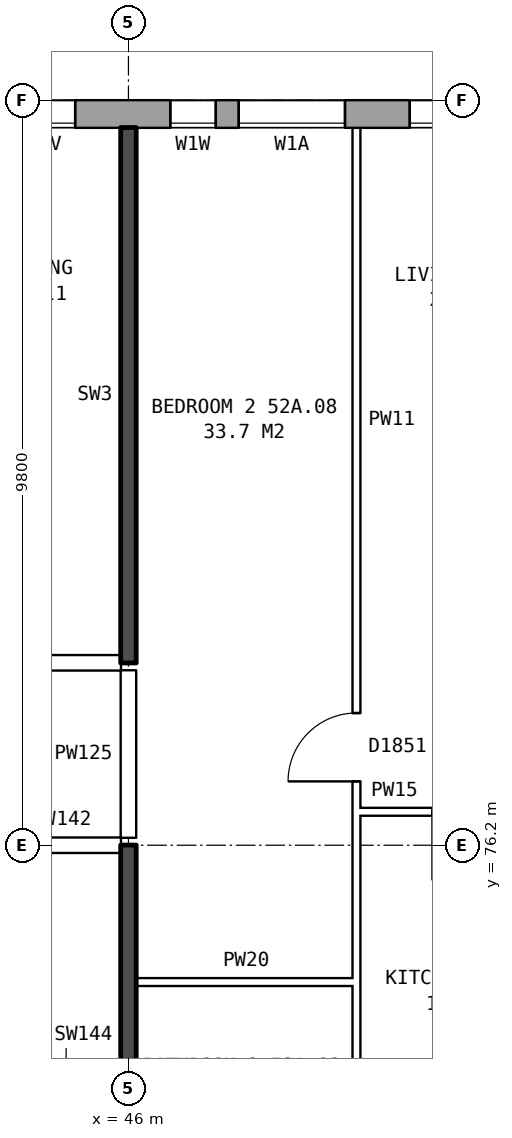
"""IFC4 building model, lengths in metres.
Left out: names, types, materials, properties, quantities, classifications, styles, units other than length and angle.
Written with IfcOpenShell. Run it as: python <this file> out.ifc"""

import sys

from ifc_helpers import new_model, si_unit, direction, frame, frame_2d, origin, place, context, subcontext, project, spatial, rectangle, extrude, element, fill, save


model = new_model("IFC4")
c1 = context("Model", 3, precision=1e-05, world=origin(), true_north=direction((0.0, 1.0)))
c2 = subcontext(c1, "Body", "Model", "MODEL_VIEW")
j1 = project(units=[si_unit("LENGTHUNIT", "METRE"), si_unit("PLANEANGLEUNIT", "RADIAN")], contexts=[c1])
p1 = place(None, origin())
s1 = spatial("IfcSite", under=j1, at=p1, CompositionType="ELEMENT")
p2 = place(p1, origin())
s2 = spatial("IfcBuilding", under=s1, at=p2, CompositionType="ELEMENT")
p3 = place(p2, frame((0.0, 0.0, 185.1)))
s3 = spatial("IfcBuildingStorey", under=s2, at=p3, CompositionType="ELEMENT", Elevation=185.1)
p4 = place(p3, frame((72.925, 85.82, 0.0), z_axis=(0.0, 0.0, 1.0), x_axis=(-1.0, 0.0, 0.0)))
e1 = element("IfcWall", 1, at=p4, inside=s3, PredefinedType="STANDARD", context=c2, shape_type="SweptSolid", body=[
    extrude(rectangle(XDim=39.601, YDim=0.36, at=frame_2d((19.8, 0.0))), origin(), (0.0, 0.0, 1.0), 2.85),
])
p5 = place(p4, frame((0.625, 0.0, 0.8)))
e2 = element("IfcOpeningElement", 2, at=p5, cuts=e1, PredefinedType="OPENING", context=c2, shape_type="SweptSolid", body=[
    extrude(rectangle(XDim=1.6, YDim=1.8, at=frame_2d((0.8, 0.9))), frame((0.0, 0.19, 0.0), z_axis=(0.0, -1.0, 0.0), x_axis=(1.0, 0.0, 0.0)), (0.0, 0.0, 1.0), 0.38),
])
p6 = place(p4, frame((3.625, 0.0, 0.8)))
e3 = element("IfcOpeningElement", 3, at=p6, cuts=e1, PredefinedType="OPENING", context=c2, shape_type="SweptSolid", body=[
    extrude(rectangle(XDim=1.6, YDim=1.8, at=frame_2d((0.8, 0.9))), frame((0.0, 0.19, 0.0), z_axis=(0.0, -1.0, 0.0), x_axis=(1.0, 0.0, 0.0)), (0.0, 0.0, 1.0), 0.38),
])
p7 = place(p4, frame((6.625, 0.0, 0.8)))
e4 = element("IfcOpeningElement", 4, at=p7, cuts=e1, PredefinedType="OPENING", context=c2, shape_type="SweptSolid", body=[
    extrude(rectangle(XDim=1.6, YDim=1.8, at=frame_2d((0.8, 0.9))), frame((0.0, 0.19, 0.0), z_axis=(0.0, -1.0, 0.0), x_axis=(1.0, 0.0, 0.0)), (0.0, 0.0, 1.0), 0.38),
])
p8 = place(p4, frame((9.625, 0.0, 0.8)))
e5 = element("IfcOpeningElement", 5, at=p8, cuts=e1, PredefinedType="OPENING", context=c2, shape_type="SweptSolid", body=[
    extrude(rectangle(XDim=1.6, YDim=1.8, at=frame_2d((0.8, 0.9))), frame((0.0, 0.19, 0.0), z_axis=(0.0, -1.0, 0.0), x_axis=(1.0, 0.0, 0.0)), (0.0, 0.0, 1.0), 0.38),
])
p9 = place(p4, frame((13.525, 0.0, 0.65)))
e6 = element("IfcOpeningElement", 6, at=p9, cuts=e1, PredefinedType="OPENING", context=c2, shape_type="SweptSolid", body=[
    extrude(rectangle(XDim=1.2, YDim=1.5, at=frame_2d((0.6, 0.75))), frame((0.0, 0.19, 0.0), z_axis=(0.0, -1.0, 0.0), x_axis=(1.0, 0.0, 0.0)), (0.0, 0.0, 1.0), 0.38),
])
p10 = place(p4, frame((15.625, 0.0, 0.8)))
e7 = element("IfcOpeningElement", 7, at=p10, cuts=e1, PredefinedType="OPENING", context=c2, shape_type="SweptSolid", body=[
    extrude(rectangle(XDim=1.6, YDim=1.8, at=frame_2d((0.8, 0.9))), frame((0.0, 0.19, 0.0), z_axis=(0.0, -1.0, 0.0), x_axis=(1.0, 0.0, 0.0)), (0.0, 0.0, 1.0), 0.38),
])
p11 = place(p4, frame((18.625, 0.0, 0.8)))
e8 = element("IfcOpeningElement", 8, at=p11, cuts=e1, PredefinedType="OPENING", context=c2, shape_type="SweptSolid", body=[
    extrude(rectangle(XDim=1.6, YDim=1.8, at=frame_2d((0.8, 0.9))), frame((0.0, 0.19, 0.0), z_axis=(0.0, -1.0, 0.0), x_axis=(1.0, 0.0, 0.0)), (0.0, 0.0, 1.0), 0.38),
])
p12 = place(p4, frame((21.625, 0.0, 0.8)))
e9 = element("IfcOpeningElement", 9, at=p12, cuts=e1, PredefinedType="OPENING", context=c2, shape_type="SweptSolid", body=[
    extrude(rectangle(XDim=1.6, YDim=1.8, at=frame_2d((0.8, 0.9))), frame((0.0, 0.19, 0.0), z_axis=(0.0, -1.0, 0.0), x_axis=(1.0, 0.0, 0.0)), (0.0, 0.0, 1.0), 0.38),
])
p13 = place(p4, frame((24.075, 0.0, 0.8)))
e10 = element("IfcOpeningElement", 10, at=p13, cuts=e1, PredefinedType="OPENING", context=c2, shape_type="SweptSolid", body=[
    extrude(rectangle(XDim=1.4, YDim=1.8, at=frame_2d((0.7, 0.9))), frame((0.0, 0.19, 0.0), z_axis=(0.0, -1.0, 0.0), x_axis=(1.0, 0.0, 0.0)), (0.0, 0.0, 1.0), 0.38),
])
p14 = place(p4, frame((27.625, 0.0, 1.7)))
e11 = element("IfcOpeningElement", 11, at=p14, cuts=e1, PredefinedType="OPENING", context=c2, shape_type="SweptSolid", body=[
    extrude(rectangle(XDim=0.8, YDim=0.9, at=frame_2d((0.4, 0.45))), frame((0.0, 0.19, 0.0), z_axis=(0.0, -1.0, 0.0), x_axis=(1.0, 0.0, 0.0)), (0.0, 0.0, 1.0), 0.38),
])
p15 = place(p4, frame((30.625, 0.0, 0.8)))
e12 = element("IfcOpeningElement", 12, at=p15, cuts=e1, PredefinedType="OPENING", context=c2, shape_type="SweptSolid", body=[
    extrude(rectangle(XDim=1.6, YDim=1.8, at=frame_2d((0.8, 0.9))), frame((0.0, 0.19, 0.0), z_axis=(0.0, -1.0, 0.0), x_axis=(1.0, 0.0, 0.0)), (0.0, 0.0, 1.0), 0.38),
])
p16 = place(p4, frame((33.625, 0.0, 0.8)))
e13 = element("IfcOpeningElement", 13, at=p16, cuts=e1, PredefinedType="OPENING", context=c2, shape_type="SweptSolid", body=[
    extrude(rectangle(XDim=1.6, YDim=1.8, at=frame_2d((0.8, 0.9))), frame((0.0, 0.19, 0.0), z_axis=(0.0, -1.0, 0.0), x_axis=(1.0, 0.0, 0.0)), (0.0, 0.0, 1.0), 0.38),
])
p17 = place(p4, frame((36.625, 0.0, 0.8)))
e14 = element("IfcOpeningElement", 14, at=p17, cuts=e1, PredefinedType="OPENING", context=c2, shape_type="SweptSolid", body=[
    extrude(rectangle(XDim=1.6, YDim=1.8, at=frame_2d((0.8, 0.9))), frame((0.0, 0.19, 0.0), z_axis=(0.0, -1.0, 0.0), x_axis=(1.0, 0.0, 0.0)), (0.0, 0.0, 1.0), 0.38),
])
p18 = place(p4, frame((25.775, 0.0, 0.8)))
e15 = element("IfcOpeningElement", 15, at=p18, cuts=e1, PredefinedType="OPENING", context=c2, shape_type="SweptSolid", body=[
    extrude(rectangle(XDim=0.6, YDim=0.9, at=frame_2d((0.3, 0.45))), frame((0.0, 0.19, 0.0), z_axis=(0.0, -1.0, 0.0), x_axis=(1.0, 0.0, 0.0)), (0.0, 0.0, 1.0), 0.38),
])
p19 = place(p4, frame((28.725, 0.0, 0.8)))
e16 = element("IfcOpeningElement", 16, at=p19, cuts=e1, PredefinedType="OPENING", context=c2, shape_type="SweptSolid", body=[
    extrude(rectangle(XDim=1.6, YDim=1.8, at=frame_2d((0.8, 0.9))), frame((0.0, 0.19, 0.0), z_axis=(0.0, -1.0, 0.0), x_axis=(1.0, 0.0, 0.0)), (0.0, 0.0, 1.0), 0.38),
])
p20 = place(p3, frame((46.1, 74.4, 0.0), z_axis=(0.0, 0.0, 1.0), x_axis=(1.0, 0.0, 0.0)))
e17 = element("IfcWall", 17, at=p20, inside=s3, PredefinedType="PARTITIONING", context=c2, shape_type="SweptSolid", body=[
    extrude(rectangle(XDim=2.9, YDim=0.1, at=frame_2d((1.45, 0.0))), origin(), (0.0, 0.0, 1.0), 2.85),
])
p21 = place(p3, frame((44.36, 76.2, 0.0), z_axis=(0.0, 0.0, 1.0), x_axis=(1.0, 0.0, 0.0)))
e18 = element("IfcWall", 18, at=p21, inside=s3, PredefinedType="PARTITIONING", context=c2, shape_type="SweptSolid", body=[
    extrude(rectangle(XDim=1.54, YDim=0.2, at=frame_2d((0.77, 0.0))), origin(), (0.0, 0.0, 1.0), 2.85),
])
p22 = place(p3, frame((49.0, 76.64, 0.0), z_axis=(0.0, 0.0, 1.0), x_axis=(1.0, 0.0, 0.0)))
e19 = element("IfcWall", 19, at=p22, inside=s3, PredefinedType="PARTITIONING", context=c2, shape_type="SweptSolid", body=[
    extrude(rectangle(XDim=2.9, YDim=0.1, at=frame_2d((1.45, 0.0))), origin(), (0.0, 0.0, 1.0), 2.85),
])
p23 = place(p22, frame((1.0, 0.0, 0.0)))
e20 = element("IfcOpeningElement", 20, at=p23, cuts=e19, PredefinedType="OPENING", context=c2, shape_type="SweptSolid", body=[
    extrude(rectangle(XDim=0.9, YDim=2.1, at=frame_2d((0.45, 1.05))), frame((0.0, 0.06, 0.0), z_axis=(0.0, -1.0, 0.0), x_axis=(1.0, 0.0, 0.0)), (0.0, 0.0, 1.0), 0.12),
])
p24 = place(p3, frame((30.61, 78.6, 0.0), z_axis=(0.0, 0.0, 1.0), x_axis=(1.0, 0.0, 0.0)))
e21 = element("IfcWall", 21, at=p24, inside=s3, PredefinedType="PARTITIONING", context=c2, shape_type="SweptSolid", body=[
    extrude(rectangle(XDim=15.29, YDim=0.2, at=frame_2d((7.645, 0.0))), origin(), (0.0, 0.0, 1.0), 2.85),
])
p25 = place(p24, frame((12.84, 0.0, 0.0)))
e22 = element("IfcOpeningElement", 22, at=p25, cuts=e21, PredefinedType="OPENING", context=c2, shape_type="SweptSolid", body=[
    extrude(rectangle(XDim=1.0, YDim=2.1, at=frame_2d((0.5, 1.05))), frame((0.0, 0.11, 0.0), z_axis=(0.0, -1.0, 0.0), x_axis=(1.0, 0.0, 0.0)), (0.0, 0.0, 1.0), 0.22),
])
p26 = place(p24, frame((5.89, 0.0, 0.0)))
e23 = element("IfcOpeningElement", 23, at=p26, cuts=e21, PredefinedType="OPENING", context=c2, shape_type="SweptSolid", body=[
    extrude(rectangle(XDim=1.0, YDim=2.1, at=frame_2d((0.5, 1.05))), frame((0.0, 0.11, 0.0), z_axis=(0.0, -1.0, 0.0), x_axis=(1.0, 0.0, 0.0)), (0.0, 0.0, 1.0), 0.22),
])
p27 = place(p3, frame((46.0, 71.2, 0.0), z_axis=(0.0, 0.0, 1.0), x_axis=(0.0, 1.0, 0.0)))
e24 = element("IfcWall", 24, at=p27, inside=s3, PredefinedType="SOLIDWALL", context=c2, shape_type="SweptSolid", body=[
    extrude(rectangle(XDim=5.0, YDim=0.2, at=frame_2d((2.5, 0.0))), origin(), (0.0, 0.0, 1.0), 2.85),
])
p28 = place(p3, frame((46.0, 76.3, 0.0), z_axis=(0.0, 0.0, 1.0), x_axis=(0.0, 1.0, 0.0)))
e25 = element("IfcWall", 25, at=p28, inside=s3, PredefinedType="PARTITIONING", context=c2, shape_type="SweptSolid", body=[
    extrude(rectangle(XDim=2.2, YDim=0.2, at=frame_2d((1.1, 0.0))), origin(), (0.0, 0.0, 1.0), 2.85),
])
p29 = place(p3, frame((46.0, 78.6, 0.0), z_axis=(0.0, 0.0, 1.0), x_axis=(0.0, 1.0, 0.0)))
e26 = element("IfcWall", 26, at=p29, inside=s3, PredefinedType="SOLIDWALL", context=c2, shape_type="SweptSolid", body=[
    extrude(rectangle(XDim=7.04, YDim=0.2, at=frame_2d((3.52, 0.0))), origin(), (0.0, 0.0, 1.0), 2.85),
])
p30 = place(p3, frame((49.0, 71.3, 0.0), z_axis=(0.0, 0.0, 1.0), x_axis=(0.0, 1.0, 0.0)))
e27 = element("IfcWall", 27, at=p30, inside=s3, PredefinedType="PARTITIONING", context=c2, shape_type="SweptSolid", body=[
    extrude(rectangle(XDim=14.34, YDim=0.1, at=frame_2d((7.17, 0.0))), origin(), (0.0, 0.0, 1.0), 2.85),
])
p31 = place(p30, frame((5.74, 0.0, 0.0)))
e28 = element("IfcOpeningElement", 28, at=p31, cuts=e27, PredefinedType="OPENING", context=c2, shape_type="SweptSolid", body=[
    extrude(rectangle(XDim=0.9, YDim=2.1, at=frame_2d((0.45, 1.05))), frame((0.0, 0.06, 0.0), z_axis=(0.0, -1.0, 0.0), x_axis=(1.0, 0.0, 0.0)), (0.0, 0.0, 1.0), 0.12),
])
p32 = place(p30, frame((0.4, 0.0, 0.0)))
e29 = element("IfcOpeningElement", 29, at=p32, cuts=e27, PredefinedType="OPENING", context=c2, shape_type="SweptSolid", body=[
    extrude(rectangle(XDim=0.9, YDim=2.1, at=frame_2d((0.45, 1.05))), frame((0.0, 0.06, 0.0), z_axis=(0.0, -1.0, 0.0), x_axis=(1.0, 0.0, 0.0)), (0.0, 0.0, 1.0), 0.12),
])
p33 = place(p12, origin())
e30 = element("IfcWindow", 30, at=p33, inside=s3, PartitioningType="SINGLE_PANEL", PredefinedType="WINDOW", context=c2, shape_type="SweptSolid", body=[
    extrude(rectangle(XDim=1.6, YDim=1.8, at=frame_2d((0.8, 0.9))), frame((0.0, 0.15, 0.0), z_axis=(0.0, -1.0, 0.0), x_axis=(1.0, 0.0, 0.0)), (0.0, 0.0, 1.0), 0.06),
])
fill(e9, e30)
p34 = place(p13, origin())
e31 = element("IfcWindow", 31, at=p34, inside=s3, PartitioningType="SINGLE_PANEL", PredefinedType="WINDOW", context=c2, shape_type="SweptSolid", body=[
    extrude(rectangle(XDim=1.4, YDim=1.8, at=frame_2d((0.7, 0.9))), frame((0.0, 0.15, 0.0), z_axis=(0.0, -1.0, 0.0), x_axis=(1.0, 0.0, 0.0)), (0.0, 0.0, 1.0), 0.06),
])
fill(e10, e31)
p35 = place(p14, origin())
e32 = element("IfcWindow", 32, at=p35, inside=s3, PartitioningType="SINGLE_PANEL", PredefinedType="WINDOW", context=c2, shape_type="SweptSolid", body=[
    extrude(rectangle(XDim=0.8, YDim=0.9, at=frame_2d((0.4, 0.45))), frame((0.0, 0.15, 0.0), z_axis=(0.0, -1.0, 0.0), x_axis=(1.0, 0.0, 0.0)), (0.0, 0.0, 1.0), 0.06),
])
fill(e11, e32)
p36 = place(p31, origin())
e33 = element("IfcDoor", 33, at=p36, inside=s3, OperationType="SINGLE_SWING_LEFT", PredefinedType="DOOR", context=c2, shape_type="SweptSolid", body=[
    extrude(rectangle(XDim=0.9, YDim=2.1, at=frame_2d((0.45, 1.05))), frame((0.0, 0.025, 0.0), z_axis=(0.0, -1.0, 0.0), x_axis=(1.0, 0.0, 0.0)), (0.0, 0.0, 1.0), 0.05),
])
fill(e28, e33)
p37 = place(p18, origin())
e34 = element("IfcWindow", 34, at=p37, inside=s3, PartitioningType="SINGLE_PANEL", PredefinedType="WINDOW", context=c2, shape_type="SweptSolid", body=[
    extrude(rectangle(XDim=0.6, YDim=0.9, at=frame_2d((0.3, 0.45))), frame((0.0, 0.15, 0.0), z_axis=(0.0, -1.0, 0.0), x_axis=(1.0, 0.0, 0.0)), (0.0, 0.0, 1.0), 0.06),
])
fill(e15, e34)
save(model, sys.argv[1])
